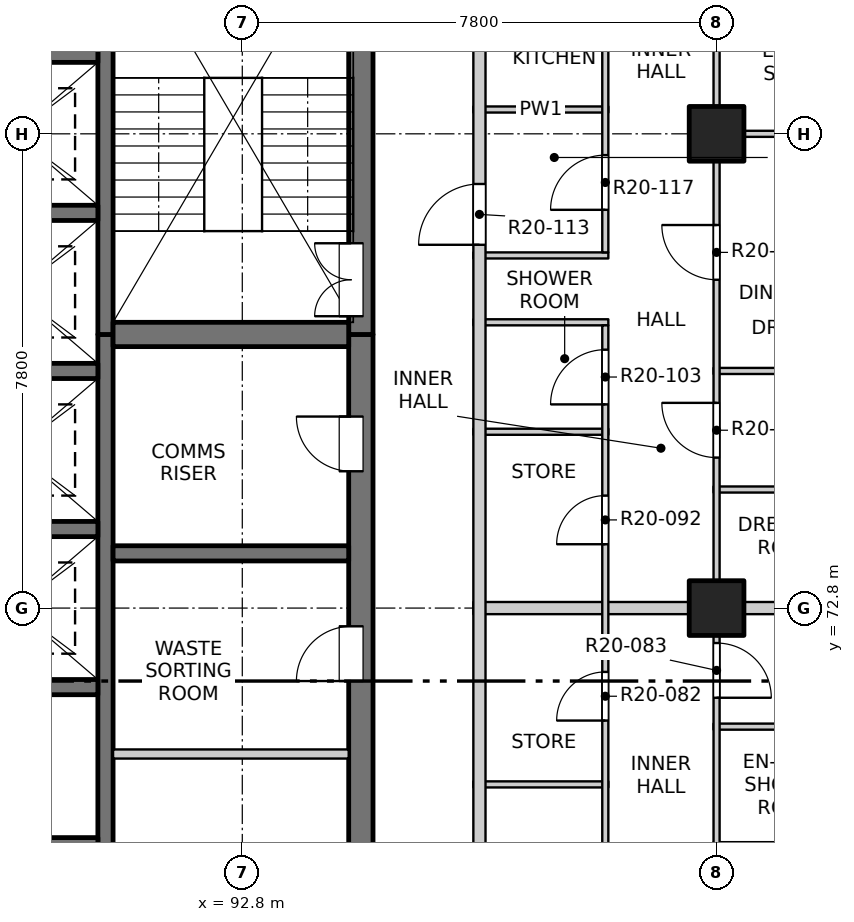
"""IFC4 building model, lengths in metres.
Left out: names, types, materials, properties, quantities, classifications, styles, units other than length and angle.
Written with IfcOpenShell. Run it as: python <this file> out.ifc"""

import sys

from ifc_helpers import new_model, si_unit, direction, frame, frame_2d, origin, origin_2d, place, context, subcontext, project, spatial, rectangle, extrude, element, fill, save


model = new_model("IFC4")
c1 = context("Model", 3, precision=1e-05, world=origin(), true_north=direction((0.0, 1.0)))
c2 = subcontext(c1, "Body", "Model", "MODEL_VIEW")
j1 = project(units=[si_unit("LENGTHUNIT", "METRE"), si_unit("PLANEANGLEUNIT", "RADIAN")], contexts=[c1])
p1 = place(None, origin())
s1 = spatial("IfcSite", under=j1, at=p1, CompositionType="ELEMENT")
p2 = place(p1, origin())
s2 = spatial("IfcBuilding", under=s1, at=p2, CompositionType="ELEMENT")
p3 = place(p2, frame((0.0, 0.0, 210.9)))
s3 = spatial("IfcBuildingStorey", under=s2, at=p3, CompositionType="ELEMENT", Elevation=210.9)
for number, where, z_axis, x_axis in (
    (1, (100.6, 72.8, -0.25), (0.0, 0.0, 1.0), (1.0, 0.0, 0.0)),
    (2, (100.6, 80.6, -0.25), (0.0, 0.0, 1.0), (1.0, 0.0, 0.0)),
):
    element("IfcColumn", number, at=place(p3, frame(where, z_axis=z_axis, x_axis=x_axis)), inside=s3, PredefinedType="COLUMN", context=c2, shape_type="SweptSolid", body=[
        extrude(rectangle(XDim=0.9, YDim=0.9, at=origin_2d()), origin(), (0.0, 0.0, 1.0), 3.4),
    ])
p4 = place(p3, frame((94.75, 61.95, -0.25), z_axis=(0.0, 0.0, 1.0), x_axis=(0.0, 1.0, 0.0)))
e3 = element("IfcWall", 3, at=p4, inside=s3, PredefinedType="SOLIDWALL", context=c2, shape_type="SweptSolid", body=[
    extrude(rectangle(XDim=15.35, YDim=0.4, at=frame_2d((7.675, 0.0))), origin(), (0.0, 0.0, 1.0), 3.4),
])
p5 = place(p4, frame((0.925, 0.0, 0.25)))
e4 = element("IfcOpeningElement", 4, at=p5, cuts=e3, PredefinedType="OPENING", context=c2, shape_type="SweptSolid", body=[
    extrude(rectangle(XDim=0.9, YDim=2.1, at=frame_2d((0.45, 1.05))), frame((0.0, 0.21, 0.0), z_axis=(0.0, -1.0, 0.0), x_axis=(1.0, 0.0, 0.0)), (0.0, 0.0, 1.0), 0.42),
])
p6 = place(p4, frame((5.15, 0.0, 0.25)))
e5 = element("IfcOpeningElement", 5, at=p6, cuts=e3, PredefinedType="OPENING", context=c2, shape_type="SweptSolid", body=[
    extrude(rectangle(XDim=0.9, YDim=2.1, at=frame_2d((0.45, 1.05))), frame((0.0, 0.21, 0.0), z_axis=(0.0, -1.0, 0.0), x_axis=(1.0, 0.0, 0.0)), (0.0, 0.0, 1.0), 0.42),
])
p7 = place(p4, frame((9.65, 0.0, 0.25)))
e6 = element("IfcOpeningElement", 6, at=p7, cuts=e3, PredefinedType="OPENING", context=c2, shape_type="SweptSolid", body=[
    extrude(rectangle(XDim=0.9, YDim=2.1, at=frame_2d((0.45, 1.05))), frame((0.0, 0.21, 0.0), z_axis=(0.0, -1.0, 0.0), x_axis=(1.0, 0.0, 0.0)), (0.0, 0.0, 1.0), 0.42),
])
p8 = place(p4, frame((13.1, 0.0, 0.25)))
e7 = element("IfcOpeningElement", 7, at=p8, cuts=e3, PredefinedType="OPENING", context=c2, shape_type="SweptSolid", body=[
    extrude(rectangle(XDim=0.9, YDim=2.1, at=frame_2d((0.45, 1.05))), frame((0.0, 0.21, 0.0), z_axis=(0.0, -1.0, 0.0), x_axis=(1.0, 0.0, 0.0)), (0.0, 0.0, 1.0), 0.42),
])
p9 = place(p3, frame((94.75, 77.3, -0.25), z_axis=(0.0, 0.0, 1.0), x_axis=(0.0, 1.0, 0.0)))
e8 = element("IfcWall", 8, at=p9, inside=s3, PredefinedType="SOLIDWALL", context=c2, shape_type="SweptSolid", body=[
    extrude(rectangle(XDim=7.4, YDim=0.4, at=frame_2d((3.7, 0.0))), origin(), (0.0, 0.0, 1.0), 3.4),
])
p10 = place(p9, frame((0.3, 0.0, 0.25)))
e9 = element("IfcOpeningElement", 9, at=p10, cuts=e8, PredefinedType="OPENING", context=c2, shape_type="SweptSolid", body=[
    extrude(rectangle(XDim=1.2, YDim=2.1, at=frame_2d((0.6, 1.05))), frame((0.0, 0.21, 0.0), z_axis=(0.0, -1.0, 0.0), x_axis=(1.0, 0.0, 0.0)), (0.0, 0.0, 1.0), 0.42),
])
p11 = place(p3, frame((90.55, 61.95, -0.25), z_axis=(0.0, 0.0, 1.0), x_axis=(0.0, 1.0, 0.0)))
e10 = element("IfcWall", 10, at=p11, inside=s3, PredefinedType="SOLIDWALL", context=c2, shape_type="SweptSolid", body=[
    extrude(rectangle(XDim=15.35, YDim=0.25, at=frame_2d((7.675, 0.0))), origin(), (0.0, 0.0, 1.0), 3.4),
])
p12 = place(p3, frame((90.55, 77.3, -0.25), z_axis=(0.0, 0.0, 1.0), x_axis=(0.0, 1.0, 0.0)))
e11 = element("IfcWall", 11, at=p12, inside=s3, PredefinedType="SOLIDWALL", context=c2, shape_type="SweptSolid", body=[
    extrude(rectangle(XDim=7.0, YDim=0.25, at=frame_2d((3.5, 0.0))), origin(), (0.0, 0.0, 1.0), 3.4),
])
for number, where, z_axis, x_axis in (
    (12, (87.425, 68.9, -0.25), (0.0, 0.0, 1.0), (1.0, 0.0, 0.0)),
    (13, (87.425, 71.5, -0.25), (0.0, 0.0, 1.0), (1.0, 0.0, 0.0)),
    (14, (87.425, 74.1, -0.25), (0.0, 0.0, 1.0), (1.0, 0.0, 0.0)),
    (15, (87.425, 76.7, -0.25), (0.0, 0.0, 1.0), (1.0, 0.0, 0.0)),
    (16, (87.425, 79.3, -0.25), (0.0, 0.0, 1.0), (1.0, 0.0, 0.0)),
    (17, (87.425, 81.9, -0.25), (0.0, 0.0, 1.0), (1.0, 0.0, 0.0)),
):
    element("IfcWall", number, at=place(p3, frame(where, z_axis=z_axis, x_axis=x_axis)), inside=s3, PredefinedType="SOLIDWALL", context=c2, shape_type="SweptSolid", body=[
        extrude(rectangle(XDim=3.0, YDim=0.25, at=frame_2d((1.5, 0.0))), origin(), (0.0, 0.0, 1.0), 3.4),
    ])
p13 = place(p3, frame((90.675, 73.7, -0.25), z_axis=(0.0, 0.0, 1.0), x_axis=(1.0, 0.0, 0.0)))
e18 = element("IfcWall", 18, at=p13, inside=s3, PredefinedType="SOLIDWALL", context=c2, shape_type="SweptSolid", body=[
    extrude(rectangle(XDim=3.875, YDim=0.25, at=frame_2d((1.938, 0.0))), origin(), (0.0, 0.0, 1.0), 3.4),
])
p14 = place(p3, frame((90.675, 77.3, -0.25), z_axis=(0.0, 0.0, 1.0), x_axis=(1.0, 0.0, 0.0)))
e19 = element("IfcWall", 19, at=p14, inside=s3, PredefinedType="SOLIDWALL", context=c2, shape_type="SweptSolid", body=[
    extrude(rectangle(XDim=3.875, YDim=0.4, at=frame_2d((1.938, 0.0))), origin(), (0.0, 0.0, 1.0), 3.4),
])
p15 = place(p3, frame((96.6, 69.9, 0.0), z_axis=(0.0, 0.0, 1.0), x_axis=(1.0, 0.0, 0.0)))
e20 = element("IfcWall", 20, at=p15, inside=s3, PredefinedType="PARTITIONING", context=c2, shape_type="SweptSolid", body=[
    extrude(rectangle(XDim=2.22, YDim=0.1, at=frame_2d((1.11, 0.0))), origin(), (0.0, 0.0, 1.0), 3.15),
])
p16 = place(p3, frame((90.675, 70.4, 0.0), z_axis=(0.0, 0.0, 1.0), x_axis=(1.0, 0.0, 0.0)))
e21 = element("IfcWall", 21, at=p16, inside=s3, PredefinedType="PARTITIONING", context=c2, shape_type="SweptSolid", body=[
    extrude(rectangle(XDim=3.875, YDim=0.15, at=frame_2d((1.938, 0.0))), origin(), (0.0, 0.0, 1.0), 3.15),
])
p17 = place(p3, frame((100.55, 70.85, 0.0), z_axis=(0.0, 0.0, 1.0), x_axis=(1.0, 0.0, 0.0)))
e22 = element("IfcWall", 22, at=p17, inside=s3, PredefinedType="PARTITIONING", context=c2, shape_type="SweptSolid", body=[
    extrude(rectangle(XDim=3.7, YDim=0.1, at=frame_2d((1.85, 0.0))), origin(), (0.0, 0.0, 1.0), 3.15),
])
p18 = place(p3, frame((96.6, 72.8, 0.0), z_axis=(0.0, 0.0, 1.0), x_axis=(1.0, 0.0, 0.0)))
e23 = element("IfcWall", 23, at=p18, inside=s3, PredefinedType="PARTITIONING", context=c2, shape_type="SweptSolid", body=[
    extrude(rectangle(XDim=11.5, YDim=0.2, at=frame_2d((5.75, 0.0))), origin(), (0.0, 0.0, 1.0), 3.15),
])
p19 = place(p3, frame((100.55, 74.75, 0.0), z_axis=(0.0, 0.0, 1.0), x_axis=(1.0, 0.0, 0.0)))
e24 = element("IfcWall", 24, at=p19, inside=s3, PredefinedType="PARTITIONING", context=c2, shape_type="SweptSolid", body=[
    extrude(rectangle(XDim=3.7, YDim=0.1, at=frame_2d((1.85, 0.0))), origin(), (0.0, 0.0, 1.0), 3.15),
])
p20 = place(p3, frame((96.6, 75.7, 0.0), z_axis=(0.0, 0.0, 1.0), x_axis=(1.0, 0.0, 0.0)))
e25 = element("IfcWall", 25, at=p20, inside=s3, PredefinedType="PARTITIONING", context=c2, shape_type="SweptSolid", body=[
    extrude(rectangle(XDim=2.22, YDim=0.1, at=frame_2d((1.11, 0.0))), origin(), (0.0, 0.0, 1.0), 3.15),
])
p21 = place(p3, frame((100.55, 76.7, 0.0), z_axis=(0.0, 0.0, 1.0), x_axis=(1.0, 0.0, 0.0)))
e26 = element("IfcWall", 26, at=p21, inside=s3, PredefinedType="PARTITIONING", context=c2, shape_type="SweptSolid", body=[
    extrude(rectangle(XDim=7.55, YDim=0.1, at=frame_2d((3.775, 0.0))), origin(), (0.0, 0.0, 1.0), 2.55),
])
for number, where, z_axis, x_axis in (
    (27, (96.6, 77.5, 0.0), (0.0, 0.0, 1.0), (1.0, 0.0, 0.0)),
    (28, (96.6, 78.6, 0.0), (0.0, 0.0, 1.0), (1.0, 0.0, 0.0)),
):
    element("IfcWall", number, at=place(p3, frame(where, z_axis=z_axis, x_axis=x_axis)), inside=s3, PredefinedType="PARTITIONING", context=c2, shape_type="SweptSolid", body=[
        extrude(rectangle(XDim=2.22, YDim=0.1, at=frame_2d((1.11, 0.0))), origin(), (0.0, 0.0, 1.0), 3.15),
    ])
p22 = place(p3, frame((100.55, 80.6, 0.0), z_axis=(0.0, 0.0, 1.0), x_axis=(1.0, 0.0, 0.0)))
e29 = element("IfcWall", 29, at=p22, inside=s3, PredefinedType="PARTITIONING", context=c2, shape_type="SweptSolid", body=[
    extrude(rectangle(XDim=7.55, YDim=0.1, at=frame_2d((3.775, 0.0))), origin(), (0.0, 0.0, 1.0), 3.15),
])
p23 = place(p3, frame((96.6, 81.0, 0.0), z_axis=(0.0, 0.0, 1.0), x_axis=(1.0, 0.0, 0.0)))
e30 = element("IfcWall", 30, at=p23, inside=s3, PredefinedType="PARTITIONING", context=c2, shape_type="SweptSolid", body=[
    extrude(rectangle(XDim=2.22, YDim=0.1, at=frame_2d((1.11, 0.0))), origin(), (0.0, 0.0, 1.0), 3.15),
])
p24 = place(p3, frame((96.7, 49.5, 0.0), z_axis=(0.0, 0.0, 1.0), x_axis=(0.0, 1.0, 0.0)))
e31 = element("IfcWall", 31, at=p24, inside=s3, PredefinedType="PARTITIONING", context=c2, shape_type="SweptSolid", body=[
    extrude(rectangle(XDim=34.9, YDim=0.2, at=frame_2d((17.45, 0.0))), origin(), (0.0, 0.0, 1.0), 3.15),
])
p25 = place(p24, frame((9.625, 0.0, 0.0)))
e32 = element("IfcOpeningElement", 32, at=p25, cuts=e31, PredefinedType="OPENING", context=c2, shape_type="SweptSolid", body=[
    extrude(rectangle(XDim=1.0, YDim=2.1, at=frame_2d((0.5, 1.05))), frame((0.0, 0.11, 0.0), z_axis=(0.0, -1.0, 0.0), x_axis=(1.0, 0.0, 0.0)), (0.0, 0.0, 1.0), 0.22),
])
p26 = place(p24, frame((14.125, 0.0, 0.0)))
e33 = element("IfcOpeningElement", 33, at=p26, cuts=e31, PredefinedType="OPENING", context=c2, shape_type="SweptSolid", body=[
    extrude(rectangle(XDim=1.0, YDim=2.1, at=frame_2d((0.5, 1.05))), frame((0.0, 0.11, 0.0), z_axis=(0.0, -1.0, 0.0), x_axis=(1.0, 0.0, 0.0)), (0.0, 0.0, 1.0), 0.22),
])
p27 = place(p24, frame((29.275, 0.0, 0.0)))
e34 = element("IfcOpeningElement", 34, at=p27, cuts=e31, PredefinedType="OPENING", context=c2, shape_type="SweptSolid", body=[
    extrude(rectangle(XDim=1.0, YDim=2.1, at=frame_2d((0.5, 1.05))), frame((0.0, 0.11, 0.0), z_axis=(0.0, -1.0, 0.0), x_axis=(1.0, 0.0, 0.0)), (0.0, 0.0, 1.0), 0.22),
])
p28 = place(p3, frame((98.77, 63.5, 0.0), z_axis=(0.0, 0.0, 1.0), x_axis=(0.0, 1.0, 0.0)))
e35 = element("IfcWall", 35, at=p28, inside=s3, PredefinedType="PARTITIONING", context=c2, shape_type="SweptSolid", body=[
    extrude(rectangle(XDim=13.95, YDim=0.1, at=frame_2d((6.975, 0.0))), origin(), (0.0, 0.0, 1.0), 3.15),
])
p29 = place(p28, frame((1.26, 0.0, 0.0)))
e36 = element("IfcOpeningElement", 36, at=p29, cuts=e35, PredefinedType="OPENING", context=c2, shape_type="SweptSolid", body=[
    extrude(rectangle(XDim=0.9, YDim=2.1, at=frame_2d((0.45, 1.05))), frame((0.0, 0.06, 0.0), z_axis=(0.0, -1.0, 0.0), x_axis=(1.0, 0.0, 0.0)), (0.0, 0.0, 1.0), 0.12),
])
p30 = place(p28, frame((4.535, 0.0, 0.0)))
e37 = element("IfcOpeningElement", 37, at=p30, cuts=e35, PredefinedType="OPENING", context=c2, shape_type="SweptSolid", body=[
    extrude(rectangle(XDim=0.8, YDim=2.1, at=frame_2d((0.4, 1.05))), frame((0.0, 0.06, 0.0), z_axis=(0.0, -1.0, 0.0), x_axis=(1.0, 0.0, 0.0)), (0.0, 0.0, 1.0), 0.12),
])
p31 = place(p28, frame((7.45, 0.0, 0.0)))
e38 = element("IfcOpeningElement", 38, at=p31, cuts=e35, PredefinedType="OPENING", context=c2, shape_type="SweptSolid", body=[
    extrude(rectangle(XDim=0.8, YDim=2.1, at=frame_2d((0.4, 1.05))), frame((0.0, 0.06, 0.0), z_axis=(0.0, -1.0, 0.0), x_axis=(1.0, 0.0, 0.0)), (0.0, 0.0, 1.0), 0.12),
])
p32 = place(p28, frame((10.35, 0.0, 0.0)))
e39 = element("IfcOpeningElement", 39, at=p32, cuts=e35, PredefinedType="OPENING", context=c2, shape_type="SweptSolid", body=[
    extrude(rectangle(XDim=0.8, YDim=2.1, at=frame_2d((0.4, 1.05))), frame((0.0, 0.06, 0.0), z_axis=(0.0, -1.0, 0.0), x_axis=(1.0, 0.0, 0.0)), (0.0, 0.0, 1.0), 0.12),
])
p33 = place(p28, frame((12.65, 0.0, 0.0)))
e40 = element("IfcOpeningElement", 40, at=p33, cuts=e35, PredefinedType="OPENING", context=c2, shape_type="SweptSolid", body=[
    extrude(rectangle(XDim=0.9, YDim=2.1, at=frame_2d((0.45, 1.05))), frame((0.0, 0.06, 0.0), z_axis=(0.0, -1.0, 0.0), x_axis=(1.0, 0.0, 0.0)), (0.0, 0.0, 1.0), 0.12),
])
p34 = place(p3, frame((98.77, 78.65, 0.0), z_axis=(0.0, 0.0, 1.0), x_axis=(0.0, 1.0, 0.0)))
e41 = element("IfcWall", 41, at=p34, inside=s3, PredefinedType="PARTITIONING", context=c2, shape_type="SweptSolid", body=[
    extrude(rectangle(XDim=5.8, YDim=0.1, at=frame_2d((2.9, 0.0))), origin(), (0.0, 0.0, 1.0), 3.15),
])
p35 = place(p34, frame((0.7, 0.0, 0.0)))
e42 = element("IfcOpeningElement", 42, at=p35, cuts=e41, PredefinedType="OPENING", context=c2, shape_type="SweptSolid", body=[
    extrude(rectangle(XDim=0.9, YDim=2.1, at=frame_2d((0.45, 1.05))), frame((0.0, 0.06, 0.0), z_axis=(0.0, -1.0, 0.0), x_axis=(1.0, 0.0, 0.0)), (0.0, 0.0, 1.0), 0.12),
])
p36 = place(p34, frame((3.65, 0.0, 0.0)))
e43 = element("IfcOpeningElement", 43, at=p36, cuts=e41, PredefinedType="OPENING", context=c2, shape_type="SweptSolid", body=[
    extrude(rectangle(XDim=0.9, YDim=2.1, at=frame_2d((0.45, 1.05))), frame((0.0, 0.06, 0.0), z_axis=(0.0, -1.0, 0.0), x_axis=(1.0, 0.0, 0.0)), (0.0, 0.0, 1.0), 0.12),
])
p37 = place(p3, frame((100.6, 41.9, 0.0), z_axis=(0.0, 0.0, 1.0), x_axis=(0.0, 1.0, 0.0)))
e44 = element("IfcWall", 44, at=p37, inside=s3, PredefinedType="PARTITIONING", context=c2, shape_type="SweptSolid", body=[
    extrude(rectangle(XDim=46.2, YDim=0.1, at=frame_2d((23.1, 0.0))), origin(), (0.0, 0.0, 1.0), 3.15),
])
p38 = place(p37, frame((1.2, 0.0, 0.0)))
e45 = element("IfcOpeningElement", 45, at=p38, cuts=e44, PredefinedType="OPENING", context=c2, shape_type="SweptSolid", body=[
    extrude(rectangle(XDim=0.9, YDim=2.1, at=frame_2d((0.45, 1.05))), frame((0.0, 0.06, 0.0), z_axis=(0.0, -1.0, 0.0), x_axis=(1.0, 0.0, 0.0)), (0.0, 0.0, 1.0), 0.12),
])
p39 = place(p37, frame((6.025, 0.0, 0.0)))
e46 = element("IfcOpeningElement", 46, at=p39, cuts=e44, PredefinedType="OPENING", context=c2, shape_type="SweptSolid", body=[
    extrude(rectangle(XDim=0.9, YDim=2.1, at=frame_2d((0.45, 1.05))), frame((0.0, 0.06, 0.0), z_axis=(0.0, -1.0, 0.0), x_axis=(1.0, 0.0, 0.0)), (0.0, 0.0, 1.0), 0.12),
])
p40 = place(p37, frame((9.0, 0.0, 0.0)))
e47 = element("IfcOpeningElement", 47, at=p40, cuts=e44, PredefinedType="OPENING", context=c2, shape_type="SweptSolid", body=[
    extrude(rectangle(XDim=0.9, YDim=2.1, at=frame_2d((0.45, 1.05))), frame((0.0, 0.06, 0.0), z_axis=(0.0, -1.0, 0.0), x_axis=(1.0, 0.0, 0.0)), (0.0, 0.0, 1.0), 0.12),
])
p41 = place(p37, frame((13.85, 0.0, 0.0)))
e48 = element("IfcOpeningElement", 48, at=p41, cuts=e44, PredefinedType="OPENING", context=c2, shape_type="SweptSolid", body=[
    extrude(rectangle(XDim=0.9, YDim=2.1, at=frame_2d((0.45, 1.05))), frame((0.0, 0.06, 0.0), z_axis=(0.0, -1.0, 0.0), x_axis=(1.0, 0.0, 0.0)), (0.0, 0.0, 1.0), 0.12),
])
p42 = place(p37, frame((17.775, 0.0, 0.0)))
e49 = element("IfcOpeningElement", 49, at=p42, cuts=e44, PredefinedType="OPENING", context=c2, shape_type="SweptSolid", body=[
    extrude(rectangle(XDim=0.9, YDim=2.1, at=frame_2d((0.45, 1.05))), frame((0.0, 0.06, 0.0), z_axis=(0.0, -1.0, 0.0), x_axis=(1.0, 0.0, 0.0)), (0.0, 0.0, 1.0), 0.12),
])
p43 = place(p37, frame((20.7, 0.0, 0.0)))
e50 = element("IfcOpeningElement", 50, at=p43, cuts=e44, PredefinedType="OPENING", context=c2, shape_type="SweptSolid", body=[
    extrude(rectangle(XDim=0.9, YDim=2.1, at=frame_2d((0.45, 1.05))), frame((0.0, 0.06, 0.0), z_axis=(0.0, -1.0, 0.0), x_axis=(1.0, 0.0, 0.0)), (0.0, 0.0, 1.0), 0.12),
])
p44 = place(p37, frame((24.6, 0.0, 0.0)))
e51 = element("IfcOpeningElement", 51, at=p44, cuts=e44, PredefinedType="OPENING", context=c2, shape_type="SweptSolid", body=[
    extrude(rectangle(XDim=0.9, YDim=2.1, at=frame_2d((0.45, 1.05))), frame((0.0, 0.06, 0.0), z_axis=(0.0, -1.0, 0.0), x_axis=(1.0, 0.0, 0.0)), (0.0, 0.0, 1.0), 0.12),
])
p45 = place(p37, frame((29.425, 0.0, 0.0)))
e52 = element("IfcOpeningElement", 52, at=p45, cuts=e44, PredefinedType="OPENING", context=c2, shape_type="SweptSolid", body=[
    extrude(rectangle(XDim=0.9, YDim=2.1, at=frame_2d((0.45, 1.05))), frame((0.0, 0.06, 0.0), z_axis=(0.0, -1.0, 0.0), x_axis=(1.0, 0.0, 0.0)), (0.0, 0.0, 1.0), 0.12),
])
p46 = place(p37, frame((33.375, 0.0, 0.0)))
e53 = element("IfcOpeningElement", 53, at=p46, cuts=e44, PredefinedType="OPENING", context=c2, shape_type="SweptSolid", body=[
    extrude(rectangle(XDim=0.9, YDim=2.1, at=frame_2d((0.45, 1.05))), frame((0.0, 0.06, 0.0), z_axis=(0.0, -1.0, 0.0), x_axis=(1.0, 0.0, 0.0)), (0.0, 0.0, 1.0), 0.12),
])
p47 = place(p37, frame((36.3, 0.0, 0.0)))
e54 = element("IfcOpeningElement", 54, at=p47, cuts=e44, PredefinedType="OPENING", context=c2, shape_type="SweptSolid", body=[
    extrude(rectangle(XDim=0.9, YDim=2.1, at=frame_2d((0.45, 1.05))), frame((0.0, 0.06, 0.0), z_axis=(0.0, -1.0, 0.0), x_axis=(1.0, 0.0, 0.0)), (0.0, 0.0, 1.0), 0.12),
])
p48 = place(p37, frame((41.175, 0.0, 0.0)))
e55 = element("IfcOpeningElement", 55, at=p48, cuts=e44, PredefinedType="OPENING", context=c2, shape_type="SweptSolid", body=[
    extrude(rectangle(XDim=0.9, YDim=2.1, at=frame_2d((0.45, 1.05))), frame((0.0, 0.06, 0.0), z_axis=(0.0, -1.0, 0.0), x_axis=(1.0, 0.0, 0.0)), (0.0, 0.0, 1.0), 0.12),
])
p49 = place(p37, frame((44.1, 0.0, 0.0)))
e56 = element("IfcOpeningElement", 56, at=p49, cuts=e44, PredefinedType="OPENING", context=c2, shape_type="SweptSolid", body=[
    extrude(rectangle(XDim=0.9, YDim=2.1, at=frame_2d((0.45, 1.05))), frame((0.0, 0.06, 0.0), z_axis=(0.0, -1.0, 0.0), x_axis=(1.0, 0.0, 0.0)), (0.0, 0.0, 1.0), 0.12),
])
p50 = place(p31, origin())
e57 = element("IfcDoor", 57, at=p50, inside=s3, OperationType="SINGLE_SWING_LEFT", PredefinedType="DOOR", context=c2, shape_type="SweptSolid", body=[
    extrude(rectangle(XDim=0.8, YDim=2.1, at=frame_2d((0.4, 1.05))), frame((0.0, 0.025, 0.0), z_axis=(0.0, -1.0, 0.0), x_axis=(1.0, 0.0, 0.0)), (0.0, 0.0, 1.0), 0.05),
])
fill(e38, e57)
p51 = place(p45, origin())
e58 = element("IfcDoor", 58, at=p51, inside=s3, OperationType="SINGLE_SWING_RIGHT", PredefinedType="DOOR", context=c2, shape_type="SweptSolid", body=[
    extrude(rectangle(XDim=0.9, YDim=2.1, at=frame_2d((0.45, 1.05))), frame((0.0, 0.025, 0.0), z_axis=(0.0, -1.0, 0.0), x_axis=(1.0, 0.0, 0.0)), (0.0, 0.0, 1.0), 0.05),
])
fill(e52, e58)
p52 = place(p7, origin())
e59 = element("IfcDoor", 59, at=p52, inside=s3, OperationType="SINGLE_SWING_LEFT", PredefinedType="DOOR", context=c2, shape_type="SweptSolid", body=[
    extrude(rectangle(XDim=0.9, YDim=2.1, at=frame_2d((0.45, 1.05))), frame((0.0, 0.185, 0.0), z_axis=(0.0, -1.0, 0.0), x_axis=(1.0, 0.0, 0.0)), (0.0, 0.0, 1.0), 0.05),
])
fill(e6, e59)
p53 = place(p32, origin())
e60 = element("IfcDoor", 60, at=p53, inside=s3, OperationType="SINGLE_SWING_LEFT", PredefinedType="DOOR", context=c2, shape_type="SweptSolid", body=[
    extrude(rectangle(XDim=0.8, YDim=2.1, at=frame_2d((0.4, 1.05))), frame((0.0, 0.025, 0.0), z_axis=(0.0, -1.0, 0.0), x_axis=(1.0, 0.0, 0.0)), (0.0, 0.0, 1.0), 0.05),
])
fill(e39, e60)
p54 = place(p8, origin())
e61 = element("IfcDoor", 61, at=p54, inside=s3, OperationType="SINGLE_SWING_RIGHT", PredefinedType="DOOR", context=c2, shape_type="SweptSolid", body=[
    extrude(rectangle(XDim=0.9, YDim=2.1, at=frame_2d((0.45, 1.05))), frame((0.0, 0.185, 0.0), z_axis=(0.0, -1.0, 0.0), x_axis=(1.0, 0.0, 0.0)), (0.0, 0.0, 1.0), 0.05),
])
fill(e7, e61)
p55 = place(p46, origin())
e62 = element("IfcDoor", 62, at=p55, inside=s3, OperationType="SINGLE_SWING_RIGHT", PredefinedType="DOOR", context=c2, shape_type="SweptSolid", body=[
    extrude(rectangle(XDim=0.9, YDim=2.1, at=frame_2d((0.45, 1.05))), frame((0.0, 0.025, 0.0), z_axis=(0.0, -1.0, 0.0), x_axis=(1.0, 0.0, 0.0)), (0.0, 0.0, 1.0), 0.05),
])
fill(e53, e62)
p56 = place(p33, origin())
e63 = element("IfcDoor", 63, at=p56, inside=s3, OperationType="SINGLE_SWING_LEFT", PredefinedType="DOOR", context=c2, shape_type="SweptSolid", body=[
    extrude(rectangle(XDim=0.9, YDim=2.1, at=frame_2d((0.45, 1.05))), frame((0.0, 0.025, 0.0), z_axis=(0.0, -1.0, 0.0), x_axis=(1.0, 0.0, 0.0)), (0.0, 0.0, 1.0), 0.05),
])
fill(e40, e63)
p57 = place(p10, origin())
e64 = element("IfcDoor", 64, at=p57, inside=s3, OperationType="DOUBLE_DOOR_SINGLE_SWING", PredefinedType="DOOR", context=c2, shape_type="SweptSolid", body=[
    extrude(rectangle(XDim=1.2, YDim=2.1, at=frame_2d((0.6, 1.05))), frame((0.0, 0.185, 0.0), z_axis=(0.0, -1.0, 0.0), x_axis=(1.0, 0.0, 0.0)), (0.0, 0.0, 1.0), 0.05),
])
fill(e9, e64)
p58 = place(p47, origin())
e65 = element("IfcDoor", 65, at=p58, inside=s3, OperationType="SINGLE_SWING_RIGHT", PredefinedType="DOOR", context=c2, shape_type="SweptSolid", body=[
    extrude(rectangle(XDim=0.9, YDim=2.1, at=frame_2d((0.45, 1.05))), frame((0.0, 0.025, 0.0), z_axis=(0.0, -1.0, 0.0), x_axis=(1.0, 0.0, 0.0)), (0.0, 0.0, 1.0), 0.05),
])
fill(e54, e65)
p59 = place(p27, origin())
e66 = element("IfcDoor", 66, at=p59, inside=s3, OperationType="SINGLE_SWING_LEFT", PredefinedType="DOOR", context=c2, shape_type="SweptSolid", body=[
    extrude(rectangle(XDim=1.0, YDim=2.1, at=frame_2d((0.5, 1.05))), frame((0.0, 0.025, 0.0), z_axis=(0.0, -1.0, 0.0), x_axis=(1.0, 0.0, 0.0)), (0.0, 0.0, 1.0), 0.05),
])
fill(e34, e66)
p60 = place(p35, origin())
e67 = element("IfcDoor", 67, at=p60, inside=s3, OperationType="SINGLE_SWING_LEFT", PredefinedType="DOOR", context=c2, shape_type="SweptSolid", body=[
    extrude(rectangle(XDim=0.9, YDim=2.1, at=frame_2d((0.45, 1.05))), frame((0.0, 0.025, 0.0), z_axis=(0.0, -1.0, 0.0), x_axis=(1.0, 0.0, 0.0)), (0.0, 0.0, 1.0), 0.05),
])
fill(e42, e67)
save(model, sys.argv[1])
